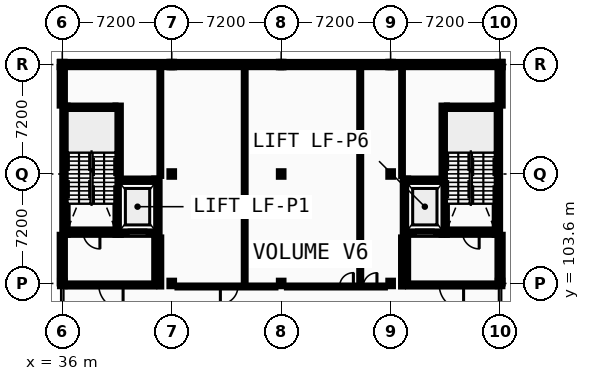
"""IFC4 building model, lengths in metres.
Left out: names, types, materials, properties, quantities, classifications, styles, units other than length and angle.
Written with IfcOpenShell. Run it as: python <this file> out.ifc"""

import sys

from ifc_helpers import new_model, si_unit, direction, frame, frame_2d, origin, origin_2d, place, context, subcontext, project, spatial, rectangle, i_section, extrude, element, fill, save


model = new_model("IFC4")
c1 = context("Model", 3, precision=1e-05, world=origin(), true_north=direction((0.0, 1.0)))
c2 = subcontext(c1, "Body", "Model", "MODEL_VIEW")
j1 = project(units=[si_unit("LENGTHUNIT", "METRE"), si_unit("PLANEANGLEUNIT", "RADIAN")], contexts=[c1])
p1 = place(None, origin())
s1 = spatial("IfcSite", under=j1, at=p1, CompositionType="ELEMENT")
p2 = place(p1, origin())
s2 = spatial("IfcBuilding", under=s1, at=p2, CompositionType="ELEMENT")
p3 = place(p2, frame((0.0, 0.0, 14.0)))
s3 = spatial("IfcBuildingStorey", under=s2, at=p3, CompositionType="ELEMENT", Elevation=14.0)
for number, where, z_axis, x_axis in (
    (1, (36.0, 103.6, 0.0), (0.0, 0.0, 1.0), (1.0, 0.0, 0.0)),
    (2, (36.0, 118.0, 0.0), (0.0, 0.0, 1.0), (1.0, 0.0, 0.0)),
    (3, (43.2, 103.6, 0.0), (0.0, 0.0, 1.0), (1.0, 0.0, 0.0)),
    (4, (43.2, 110.8, 0.0), (0.0, 0.0, 1.0), (1.0, 0.0, 0.0)),
    (5, (43.2, 118.0, 0.0), (0.0, 0.0, 1.0), (1.0, 0.0, 0.0)),
    (6, (50.4, 103.6, 0.0), (0.0, 0.0, 1.0), (1.0, 0.0, 0.0)),
    (7, (50.4, 110.8, 0.0), (0.0, 0.0, 1.0), (1.0, 0.0, 0.0)),
    (8, (50.4, 118.0, 0.0), (0.0, 0.0, 1.0), (1.0, 0.0, 0.0)),
    (9, (57.6, 103.6, 0.0), (0.0, 0.0, 1.0), (1.0, 0.0, 0.0)),
    (10, (57.6, 110.8, 0.0), (0.0, 0.0, 1.0), (1.0, 0.0, 0.0)),
    (11, (57.6, 118.0, 0.0), (0.0, 0.0, 1.0), (1.0, 0.0, 0.0)),
    (12, (64.8, 103.6, 0.0), (0.0, 0.0, 1.0), (1.0, 0.0, 0.0)),
    (13, (64.8, 118.0, 0.0), (0.0, 0.0, 1.0), (1.0, 0.0, 0.0)),
):
    element("IfcColumn", number, at=place(p3, frame(where, z_axis=z_axis, x_axis=x_axis)), inside=s3, PredefinedType="COLUMN", context=c2, shape_type="SweptSolid", body=[
        extrude(i_section(OverallWidth=0.3, OverallDepth=0.36, WebThickness=0.012, FlangeThickness=0.022, FilletRadius=0.027, at=origin_2d()), origin(), (0.0, 0.0, 1.0), 4.4),
    ])
p4 = place(p3, frame((43.2, 118.0, 0.0), z_axis=(0.0, 0.0, 1.0), x_axis=(-1.0, 0.0, 0.0)))
e14 = element("IfcWall", 14, at=p4, inside=s3, PredefinedType="STANDARD", context=c2, shape_type="SweptSolid", body=[
    extrude(rectangle(XDim=7.37, YDim=0.34, at=frame_2d((3.685, 0.0))), origin(), (0.0, 0.0, 1.0), 3.935),
])
p5 = place(p3, frame((50.4, 118.0, 0.0), z_axis=(0.0, 0.0, 1.0), x_axis=(-1.0, 0.0, 0.0)))
e15 = element("IfcWall", 15, at=p5, inside=s3, PredefinedType="STANDARD", context=c2, shape_type="SweptSolid", body=[
    extrude(rectangle(XDim=7.2, YDim=0.34, at=frame_2d((3.6, 0.0))), origin(), (0.0, 0.0, 1.0), 3.935),
])
p6 = place(p3, frame((57.6, 118.0, 0.0), z_axis=(0.0, 0.0, 1.0), x_axis=(-1.0, 0.0, 0.0)))
e16 = element("IfcWall", 16, at=p6, inside=s3, PredefinedType="STANDARD", context=c2, shape_type="SweptSolid", body=[
    extrude(rectangle(XDim=7.2, YDim=0.34, at=frame_2d((3.6, 0.0))), origin(), (0.0, 0.0, 1.0), 3.935),
])
p7 = place(p6, frame((2.5, 0.0, 0.95)))
e17 = element("IfcOpeningElement", 17, at=p7, cuts=e16, PredefinedType="OPENING", context=c2, shape_type="SweptSolid", body=[
    extrude(rectangle(XDim=2.2, YDim=1.75, at=frame_2d((1.1, 0.875))), frame((0.0, 0.18, 0.0), z_axis=(0.0, -1.0, 0.0), x_axis=(1.0, 0.0, 0.0)), (0.0, 0.0, 1.0), 0.36),
])
p8 = place(p3, frame((64.97, 118.0, 0.0), z_axis=(0.0, 0.0, 1.0), x_axis=(-1.0, 0.0, 0.0)))
e18 = element("IfcWall", 18, at=p8, inside=s3, PredefinedType="STANDARD", context=c2, shape_type="SweptSolid", body=[
    extrude(rectangle(XDim=7.37, YDim=0.34, at=frame_2d((3.685, 0.0))), origin(), (0.0, 0.0, 1.0), 3.935),
])
p9 = place(p8, frame((1.781, 0.0, 0.95)))
e19 = element("IfcOpeningElement", 19, at=p9, cuts=e18, PredefinedType="OPENING", context=c2, shape_type="SweptSolid", body=[
    extrude(rectangle(XDim=0.86, YDim=1.26, at=frame_2d((0.43, 0.63))), frame((0.0, 0.18, 0.0), z_axis=(0.0, -1.0, 0.0), x_axis=(1.0, 0.0, 0.0)), (0.0, 0.0, 1.0), 0.36),
])
p10 = place(p8, frame((4.729, 0.0, 0.95)))
e20 = element("IfcOpeningElement", 20, at=p10, cuts=e18, PredefinedType="OPENING", context=c2, shape_type="SweptSolid", body=[
    extrude(rectangle(XDim=0.86, YDim=1.26, at=frame_2d((0.43, 0.63))), frame((0.0, 0.18, 0.0), z_axis=(0.0, -1.0, 0.0), x_axis=(1.0, 0.0, 0.0)), (0.0, 0.0, 1.0), 0.36),
])
p11 = place(p3, frame((36.0, 106.8, 0.0), z_axis=(0.0, 0.0, 1.0), x_axis=(0.0, -1.0, 0.0)))
e21 = element("IfcWall", 21, at=p11, inside=s3, PredefinedType="STANDARD", context=c2, shape_type="SweptSolid", body=[
    extrude(rectangle(XDim=3.2, YDim=0.34, at=frame_2d((1.6, 0.0))), origin(), (0.0, 0.0, 1.0), 4.2),
])
p12 = place(p11, frame((1.153, 0.0, 0.95)))
e22 = element("IfcOpeningElement", 22, at=p12, cuts=e21, PredefinedType="OPENING", context=c2, shape_type="SweptSolid", body=[
    extrude(rectangle(XDim=0.894, YDim=1.26, at=frame_2d((0.447, 0.63))), frame((0.0, 0.18, 0.0), z_axis=(0.0, -1.0, 0.0), x_axis=(1.0, 0.0, 0.0)), (0.0, 0.0, 1.0), 0.36),
])
p13 = place(p3, frame((36.0, 117.83, 0.0), z_axis=(0.0, 0.0, 1.0), x_axis=(0.0, -1.0, 0.0)))
e23 = element("IfcWall", 23, at=p13, inside=s3, PredefinedType="STANDARD", context=c2, shape_type="SweptSolid", body=[
    extrude(rectangle(XDim=2.53, YDim=0.34, at=frame_2d((1.265, 0.0))), origin(), (0.0, 0.0, 1.0), 4.2),
])
p14 = place(p3, frame((64.8, 103.6, 0.0), z_axis=(0.0, 0.0, 1.0), x_axis=(0.0, 1.0, 0.0)))
e24 = element("IfcWall", 24, at=p14, inside=s3, PredefinedType="STANDARD", context=c2, shape_type="SweptSolid", body=[
    extrude(rectangle(XDim=3.2, YDim=0.34, at=frame_2d((1.6, 0.0))), origin(), (0.0, 0.0, 1.0), 4.2),
])
p15 = place(p14, frame((1.119, 0.0, 0.95)))
e25 = element("IfcOpeningElement", 25, at=p15, cuts=e24, PredefinedType="OPENING", context=c2, shape_type="SweptSolid", body=[
    extrude(rectangle(XDim=0.962, YDim=1.26, at=frame_2d((0.481, 0.63))), frame((0.0, 0.18, 0.0), z_axis=(0.0, -1.0, 0.0), x_axis=(1.0, 0.0, 0.0)), (0.0, 0.0, 1.0), 0.36),
])
p16 = place(p3, frame((64.8, 115.3, 0.0), z_axis=(0.0, 0.0, 1.0), x_axis=(0.0, 1.0, 0.0)))
e26 = element("IfcWall", 26, at=p16, inside=s3, PredefinedType="STANDARD", context=c2, shape_type="SweptSolid", body=[
    extrude(rectangle(XDim=2.53, YDim=0.34, at=frame_2d((1.265, 0.0))), origin(), (0.0, 0.0, 1.0), 4.2),
])
p17 = place(p3, frame((36.35, 106.975, 0.0), z_axis=(0.0, 0.0, 1.0), x_axis=(1.0, 0.0, 0.0)))
e27 = element("IfcWall", 27, at=p17, inside=s3, PredefinedType="SHEAR", context=c2, shape_type="SweptSolid", body=[
    extrude(rectangle(XDim=3.15, YDim=0.35, at=frame_2d((1.575, 0.0))), origin(), (0.0, 0.0, 1.0), 4.2),
])
p18 = place(p17, frame((1.025, 0.0, 0.0)))
e28 = element("IfcOpeningElement", 28, at=p18, cuts=e27, PredefinedType="OPENING", context=c2, shape_type="SweptSolid", body=[
    extrude(rectangle(XDim=1.1, YDim=2.15, at=frame_2d((0.55, 1.075))), frame((0.0, 0.185, 0.0), z_axis=(0.0, -1.0, 0.0), x_axis=(1.0, 0.0, 0.0)), (0.0, 0.0, 1.0), 0.37),
])
p19 = place(p3, frame((36.35, 115.125, 0.0), z_axis=(0.0, 0.0, 1.0), x_axis=(1.0, 0.0, 0.0)))
e29 = element("IfcWall", 29, at=p19, inside=s3, PredefinedType="SHEAR", context=c2, shape_type="SweptSolid", body=[
    extrude(rectangle(XDim=3.15, YDim=0.35, at=frame_2d((1.575, 0.0))), origin(), (0.0, 0.0, 1.0), 4.2),
])
for number, where, z_axis, x_axis in (
    (30, (36.175, 106.8, 0.0), (0.0, 0.0, 1.0), (0.0, 1.0, 0.0)),
    (31, (39.675, 106.8, 0.0), (0.0, 0.0, 1.0), (0.0, 1.0, 0.0)),
):
    element("IfcWall", number, at=place(p3, frame(where, z_axis=z_axis, x_axis=x_axis)), inside=s3, PredefinedType="SHEAR", context=c2, shape_type="SweptSolid", body=[
        extrude(rectangle(XDim=8.5, YDim=0.35, at=frame_2d((4.25, 0.0))), origin(), (0.0, 0.0, 1.0), 4.2),
    ])
p20 = place(p3, frame((39.85, 106.975, 0.0), z_axis=(0.0, 0.0, 1.0), x_axis=(1.0, 0.0, 0.0)))
e32 = element("IfcWall", 32, at=p20, inside=s3, PredefinedType="SHEAR", context=c2, shape_type="SweptSolid", body=[
    extrude(rectangle(XDim=2.2, YDim=0.35, at=frame_2d((1.1, 0.0))), origin(), (0.0, 0.0, 1.0), 4.2),
])
p21 = place(p20, frame((0.5, 0.0, 0.0)))
e33 = element("IfcOpeningElement", 33, at=p21, cuts=e32, PredefinedType="OPENING", context=c2, shape_type="SweptSolid", body=[
    extrude(rectangle(XDim=1.2, YDim=2.2, at=frame_2d((0.6, 1.1))), frame((0.0, 0.185, 0.0), z_axis=(0.0, -1.0, 0.0), x_axis=(1.0, 0.0, 0.0)), (0.0, 0.0, 1.0), 0.37),
])
p22 = place(p3, frame((39.85, 110.325, 0.0), z_axis=(0.0, 0.0, 1.0), x_axis=(1.0, 0.0, 0.0)))
e34 = element("IfcWall", 34, at=p22, inside=s3, PredefinedType="SHEAR", context=c2, shape_type="SweptSolid", body=[
    extrude(rectangle(XDim=2.2, YDim=0.35, at=frame_2d((1.1, 0.0))), origin(), (0.0, 0.0, 1.0), 4.2),
])
p23 = place(p3, frame((42.225, 106.8, 0.0), z_axis=(0.0, 0.0, 1.0), x_axis=(0.0, 1.0, 0.0)))
e35 = element("IfcWall", 35, at=p23, inside=s3, PredefinedType="SHEAR", context=c2, shape_type="SweptSolid", body=[
    extrude(rectangle(XDim=3.7, YDim=0.35, at=frame_2d((1.85, 0.0))), origin(), (0.0, 0.0, 1.0), 4.2),
])
p24 = place(p3, frame((36.35, 103.5, 0.0), z_axis=(0.0, 0.0, 1.0), x_axis=(1.0, 0.0, 0.0)))
e36 = element("IfcWall", 36, at=p24, inside=s3, PredefinedType="PARTITIONING", context=c2, shape_type="SweptSolid", body=[
    extrude(rectangle(XDim=5.7, YDim=0.2, at=frame_2d((2.85, 0.0))), origin(), (0.0, 0.0, 1.0), 3.935),
])
p25 = place(p24, frame((2.05, 0.0, 0.0)))
e37 = element("IfcOpeningElement", 37, at=p25, cuts=e36, PredefinedType="OPENING", context=c2, shape_type="SweptSolid", body=[
    extrude(rectangle(XDim=1.6, YDim=2.2, at=frame_2d((0.8, 1.1))), frame((0.0, 0.11, 0.0), z_axis=(0.0, -1.0, 0.0), x_axis=(1.0, 0.0, 0.0)), (0.0, 0.0, 1.0), 0.22),
])
p26 = place(p3, frame((42.15, 103.6, 0.0), z_axis=(0.0, 0.0, 1.0), x_axis=(0.0, 1.0, 0.0)))
e38 = element("IfcWall", 38, at=p26, inside=s3, PredefinedType="PARTITIONING", context=c2, shape_type="SweptSolid", body=[
    extrude(rectangle(XDim=3.2, YDim=0.2, at=frame_2d((1.6, 0.0))), origin(), (0.0, 0.0, 1.0), 4.2),
])
p27 = place(p3, frame((61.3, 106.975, 0.0), z_axis=(0.0, 0.0, 1.0), x_axis=(1.0, 0.0, 0.0)))
e39 = element("IfcWall", 39, at=p27, inside=s3, PredefinedType="SHEAR", context=c2, shape_type="SweptSolid", body=[
    extrude(rectangle(XDim=3.15, YDim=0.35, at=frame_2d((1.575, 0.0))), origin(), (0.0, 0.0, 1.0), 4.2),
])
p28 = place(p27, frame((1.025, 0.0, 0.0)))
e40 = element("IfcOpeningElement", 40, at=p28, cuts=e39, PredefinedType="OPENING", context=c2, shape_type="SweptSolid", body=[
    extrude(rectangle(XDim=1.1, YDim=2.15, at=frame_2d((0.55, 1.075))), frame((0.0, 0.185, 0.0), z_axis=(0.0, -1.0, 0.0), x_axis=(1.0, 0.0, 0.0)), (0.0, 0.0, 1.0), 0.37),
])
p29 = place(p3, frame((61.3, 115.125, 0.0), z_axis=(0.0, 0.0, 1.0), x_axis=(1.0, 0.0, 0.0)))
e41 = element("IfcWall", 41, at=p29, inside=s3, PredefinedType="SHEAR", context=c2, shape_type="SweptSolid", body=[
    extrude(rectangle(XDim=3.15, YDim=0.35, at=frame_2d((1.575, 0.0))), origin(), (0.0, 0.0, 1.0), 4.2),
])
for number, where, z_axis, x_axis in (
    (42, (61.125, 106.8, 0.0), (0.0, 0.0, 1.0), (0.0, 1.0, 0.0)),
    (43, (64.625, 106.8, 0.0), (0.0, 0.0, 1.0), (0.0, 1.0, 0.0)),
):
    element("IfcWall", number, at=place(p3, frame(where, z_axis=z_axis, x_axis=x_axis)), inside=s3, PredefinedType="SHEAR", context=c2, shape_type="SweptSolid", body=[
        extrude(rectangle(XDim=8.5, YDim=0.35, at=frame_2d((4.25, 0.0))), origin(), (0.0, 0.0, 1.0), 4.2),
    ])
p30 = place(p3, frame((58.75, 106.975, 0.0), z_axis=(0.0, 0.0, 1.0), x_axis=(1.0, 0.0, 0.0)))
e44 = element("IfcWall", 44, at=p30, inside=s3, PredefinedType="SHEAR", context=c2, shape_type="SweptSolid", body=[
    extrude(rectangle(XDim=2.2, YDim=0.35, at=frame_2d((1.1, 0.0))), origin(), (0.0, 0.0, 1.0), 4.2),
])
p31 = place(p30, frame((0.5, 0.0, 0.0)))
e45 = element("IfcOpeningElement", 45, at=p31, cuts=e44, PredefinedType="OPENING", context=c2, shape_type="SweptSolid", body=[
    extrude(rectangle(XDim=1.2, YDim=2.2, at=frame_2d((0.6, 1.1))), frame((0.0, 0.185, 0.0), z_axis=(0.0, -1.0, 0.0), x_axis=(1.0, 0.0, 0.0)), (0.0, 0.0, 1.0), 0.37),
])
p32 = place(p3, frame((58.75, 110.325, 0.0), z_axis=(0.0, 0.0, 1.0), x_axis=(1.0, 0.0, 0.0)))
e46 = element("IfcWall", 46, at=p32, inside=s3, PredefinedType="SHEAR", context=c2, shape_type="SweptSolid", body=[
    extrude(rectangle(XDim=2.2, YDim=0.35, at=frame_2d((1.1, 0.0))), origin(), (0.0, 0.0, 1.0), 4.2),
])
p33 = place(p3, frame((58.575, 106.8, 0.0), z_axis=(0.0, 0.0, 1.0), x_axis=(0.0, 1.0, 0.0)))
e47 = element("IfcWall", 47, at=p33, inside=s3, PredefinedType="SHEAR", context=c2, shape_type="SweptSolid", body=[
    extrude(rectangle(XDim=3.7, YDim=0.35, at=frame_2d((1.85, 0.0))), origin(), (0.0, 0.0, 1.0), 4.2),
])
p34 = place(p3, frame((58.75, 103.5, 0.0), z_axis=(0.0, 0.0, 1.0), x_axis=(1.0, 0.0, 0.0)))
e48 = element("IfcWall", 48, at=p34, inside=s3, PredefinedType="PARTITIONING", context=c2, shape_type="SweptSolid", body=[
    extrude(rectangle(XDim=5.7, YDim=0.2, at=frame_2d((2.85, 0.0))), origin(), (0.0, 0.0, 1.0), 3.935),
])
p35 = place(p34, frame((2.05, 0.0, 0.0)))
e49 = element("IfcOpeningElement", 49, at=p35, cuts=e48, PredefinedType="OPENING", context=c2, shape_type="SweptSolid", body=[
    extrude(rectangle(XDim=1.6, YDim=2.2, at=frame_2d((0.8, 1.1))), frame((0.0, 0.11, 0.0), z_axis=(0.0, -1.0, 0.0), x_axis=(1.0, 0.0, 0.0)), (0.0, 0.0, 1.0), 0.22),
])
p36 = place(p3, frame((58.65, 103.6, 0.0), z_axis=(0.0, 0.0, 1.0), x_axis=(0.0, 1.0, 0.0)))
e50 = element("IfcWall", 50, at=p36, inside=s3, PredefinedType="PARTITIONING", context=c2, shape_type="SweptSolid", body=[
    extrude(rectangle(XDim=3.2, YDim=0.2, at=frame_2d((1.6, 0.0))), origin(), (0.0, 0.0, 1.0), 4.2),
])
p37 = place(p3, frame((43.58, 103.4, 0.0), z_axis=(0.0, 0.0, 1.0), x_axis=(1.0, 0.0, 0.0)))
e51 = element("IfcWall", 51, at=p37, inside=s3, PredefinedType="PARTITIONING", context=c2, shape_type="SweptSolid", body=[
    extrude(rectangle(XDim=6.44, YDim=0.125, at=frame_2d((3.22, 0.0))), origin(), (0.0, 0.0, 1.0), 3.935),
])
p38 = place(p37, frame((2.82, 0.0, 0.0)))
e52 = element("IfcOpeningElement", 52, at=p38, cuts=e51, PredefinedType="OPENING", context=c2, shape_type="SweptSolid", body=[
    extrude(rectangle(XDim=1.15, YDim=2.15, at=frame_2d((0.575, 1.075))), frame((0.0, 0.073, 0.0), z_axis=(0.0, -1.0, 0.0), x_axis=(1.0, 0.0, 0.0)), (0.0, 0.0, 1.0), 0.145),
])
p39 = place(p3, frame((50.78, 103.4, 0.0), z_axis=(0.0, 0.0, 1.0), x_axis=(1.0, 0.0, 0.0)))
e53 = element("IfcWall", 53, at=p39, inside=s3, PredefinedType="PARTITIONING", context=c2, shape_type="SweptSolid", body=[
    extrude(rectangle(XDim=6.44, YDim=0.125, at=frame_2d((3.22, 0.0))), origin(), (0.0, 0.0, 1.0), 3.935),
])
p40 = place(p39, frame((5.02, 0.0, 0.0)))
e54 = element("IfcOpeningElement", 54, at=p40, cuts=e53, PredefinedType="OPENING", context=c2, shape_type="SweptSolid", body=[
    extrude(rectangle(XDim=0.9, YDim=2.1, at=frame_2d((0.45, 1.05))), frame((0.0, 0.073, 0.0), z_axis=(0.0, -1.0, 0.0), x_axis=(1.0, 0.0, 0.0)), (0.0, 0.0, 1.0), 0.145),
])
p41 = place(p39, frame((3.464, 0.0, 0.0)))
e55 = element("IfcOpeningElement", 55, at=p41, cuts=e53, PredefinedType="OPENING", context=c2, shape_type="SweptSolid", body=[
    extrude(rectangle(XDim=0.906, YDim=2.068, at=frame_2d((0.453, 1.034))), frame((0.0, 0.073, 0.0), z_axis=(0.0, -1.0, 0.0), x_axis=(1.0, 0.0, 0.0)), (0.0, 0.0, 1.0), 0.145),
])
p42 = place(p3, frame((42.45, 103.4, 0.0), z_axis=(0.0, 0.0, 1.0), x_axis=(0.0, 1.0, 0.0)))
e56 = element("IfcWall", 56, at=p42, inside=s3, PredefinedType="PARTITIONING", context=c2, shape_type="SweptSolid", body=[
    extrude(rectangle(XDim=3.225, YDim=0.118, at=frame_2d((1.613, 0.0))), origin(), (0.0, 0.0, 1.0), 4.2),
])
p43 = place(p3, frame((42.45, 110.675, 0.0), z_axis=(0.0, 0.0, 1.0), x_axis=(0.0, 1.0, 0.0)))
e57 = element("IfcWall", 57, at=p43, inside=s3, PredefinedType="PARTITIONING", context=c2, shape_type="SweptSolid", body=[
    extrude(rectangle(XDim=7.125, YDim=0.118, at=frame_2d((3.562, 0.0))), origin(), (0.0, 0.0, 1.0), 4.2),
])
p44 = place(p3, frame((48.0, 103.462, 0.0), z_axis=(0.0, 0.0, 1.0), x_axis=(0.0, 1.0, 0.0)))
e58 = element("IfcWall", 58, at=p44, inside=s3, PredefinedType="PARTITIONING", context=c2, shape_type="SweptSolid", body=[
    extrude(rectangle(XDim=14.338, YDim=0.118, at=frame_2d((7.169, 0.0))), origin(), (0.0, 0.0, 1.0), 3.945),
])
p45 = place(p3, frame((55.6, 103.462, 0.0), z_axis=(0.0, 0.0, 1.0), x_axis=(0.0, 1.0, 0.0)))
e59 = element("IfcWall", 59, at=p45, inside=s3, PredefinedType="PARTITIONING", context=c2, shape_type="SweptSolid", body=[
    extrude(rectangle(XDim=14.338, YDim=0.125, at=frame_2d((7.169, 0.0))), origin(), (0.0, 0.0, 1.0), 4.2),
])
p46 = place(p3, frame((58.35, 103.4, 0.0), z_axis=(0.0, 0.0, 1.0), x_axis=(0.0, 1.0, 0.0)))
e60 = element("IfcWall", 60, at=p46, inside=s3, PredefinedType="PARTITIONING", context=c2, shape_type="SweptSolid", body=[
    extrude(rectangle(XDim=3.225, YDim=0.125, at=frame_2d((1.613, 0.0))), origin(), (0.0, 0.0, 1.0), 4.2),
])
p47 = place(p3, frame((58.35, 110.675, 0.0), z_axis=(0.0, 0.0, 1.0), x_axis=(0.0, 1.0, 0.0)))
e61 = element("IfcWall", 61, at=p47, inside=s3, PredefinedType="PARTITIONING", context=c2, shape_type="SweptSolid", body=[
    extrude(rectangle(XDim=7.125, YDim=0.11, at=frame_2d((3.562, 0.0))), origin(), (0.0, 0.0, 1.0), 4.2),
])
p48 = place(p7, origin())
e62 = element("IfcWindow", 62, at=p48, inside=s3, PartitioningType="SINGLE_PANEL", PredefinedType="WINDOW", context=c2, shape_type="SweptSolid", body=[
    extrude(rectangle(XDim=2.2, YDim=1.75, at=frame_2d((1.1, 0.875))), frame((0.0, 0.03, 0.0), z_axis=(0.0, -1.0, 0.0), x_axis=(1.0, 0.0, 0.0)), (0.0, 0.0, 1.0), 0.06),
])
fill(e17, e62)
p49 = place(p9, origin())
e63 = element("IfcWindow", 63, at=p49, inside=s3, PartitioningType="SINGLE_PANEL", PredefinedType="WINDOW", context=c2, shape_type="SweptSolid", body=[
    extrude(rectangle(XDim=0.86, YDim=1.26, at=frame_2d((0.43, 0.63))), frame((0.0, 0.03, 0.0), z_axis=(0.0, -1.0, 0.0), x_axis=(1.0, 0.0, 0.0)), (0.0, 0.0, 1.0), 0.06),
])
fill(e19, e63)
p50 = place(p10, origin())
e64 = element("IfcWindow", 64, at=p50, inside=s3, PartitioningType="SINGLE_PANEL", PredefinedType="WINDOW", context=c2, shape_type="SweptSolid", body=[
    extrude(rectangle(XDim=0.86, YDim=1.26, at=frame_2d((0.43, 0.63))), frame((0.0, 0.03, 0.0), z_axis=(0.0, -1.0, 0.0), x_axis=(1.0, 0.0, 0.0)), (0.0, 0.0, 1.0), 0.06),
])
fill(e20, e64)
p51 = place(p12, origin())
e65 = element("IfcWindow", 65, at=p51, inside=s3, PartitioningType="SINGLE_PANEL", PredefinedType="WINDOW", context=c2, shape_type="SweptSolid", body=[
    extrude(rectangle(XDim=0.894, YDim=1.26, at=frame_2d((0.447, 0.63))), frame((0.0, 0.03, 0.0), z_axis=(0.0, -1.0, 0.0), x_axis=(1.0, 0.0, 0.0)), (0.0, 0.0, 1.0), 0.06),
])
fill(e22, e65)
p52 = place(p15, origin())
e66 = element("IfcWindow", 66, at=p52, inside=s3, PartitioningType="SINGLE_PANEL", PredefinedType="WINDOW", context=c2, shape_type="SweptSolid", body=[
    extrude(rectangle(XDim=0.962, YDim=1.26, at=frame_2d((0.481, 0.63))), frame((0.0, 0.03, 0.0), z_axis=(0.0, -1.0, 0.0), x_axis=(1.0, 0.0, 0.0)), (0.0, 0.0, 1.0), 0.06),
])
fill(e25, e66)
p53 = place(p18, origin())
e67 = element("IfcDoor", 67, at=p53, inside=s3, OperationType="SINGLE_SWING_RIGHT", PredefinedType="DOOR", context=c2, shape_type="SweptSolid", body=[
    extrude(rectangle(XDim=1.1, YDim=2.15, at=frame_2d((0.55, 1.075))), frame((0.0, 0.025, 0.0), z_axis=(0.0, -1.0, 0.0), x_axis=(1.0, 0.0, 0.0)), (0.0, 0.0, 1.0), 0.05),
])
fill(e28, e67)
p54 = place(p21, origin())
e68 = element("IfcDoor", 68, at=p54, inside=s3, OperationType="SLIDING_TO_RIGHT", PredefinedType="DOOR", context=c2, shape_type="SweptSolid", body=[
    extrude(rectangle(XDim=1.2, YDim=2.2, at=frame_2d((0.6, 1.1))), frame((0.0, 0.025, 0.0), z_axis=(0.0, -1.0, 0.0), x_axis=(1.0, 0.0, 0.0)), (0.0, 0.0, 1.0), 0.05),
])
fill(e33, e68)
p55 = place(p25, origin())
e69 = element("IfcDoor", 69, at=p55, inside=s3, OperationType="DOUBLE_DOOR_SINGLE_SWING", PredefinedType="DOOR", context=c2, shape_type="SweptSolid", body=[
    extrude(rectangle(XDim=1.6, YDim=2.2, at=frame_2d((0.8, 1.1))), frame((0.0, 0.025, 0.0), z_axis=(0.0, -1.0, 0.0), x_axis=(1.0, 0.0, 0.0)), (0.0, 0.0, 1.0), 0.05),
])
fill(e37, e69)
p56 = place(p28, origin())
e70 = element("IfcDoor", 70, at=p56, inside=s3, OperationType="SINGLE_SWING_RIGHT", PredefinedType="DOOR", context=c2, shape_type="SweptSolid", body=[
    extrude(rectangle(XDim=1.1, YDim=2.15, at=frame_2d((0.55, 1.075))), frame((0.0, 0.025, 0.0), z_axis=(0.0, -1.0, 0.0), x_axis=(1.0, 0.0, 0.0)), (0.0, 0.0, 1.0), 0.05),
])
fill(e40, e70)
p57 = place(p31, origin())
e71 = element("IfcDoor", 71, at=p57, inside=s3, OperationType="SLIDING_TO_RIGHT", PredefinedType="DOOR", context=c2, shape_type="SweptSolid", body=[
    extrude(rectangle(XDim=1.2, YDim=2.2, at=frame_2d((0.6, 1.1))), frame((0.0, 0.025, 0.0), z_axis=(0.0, -1.0, 0.0), x_axis=(1.0, 0.0, 0.0)), (0.0, 0.0, 1.0), 0.05),
])
fill(e45, e71)
p58 = place(p35, origin())
e72 = element("IfcDoor", 72, at=p58, inside=s3, OperationType="DOUBLE_DOOR_SINGLE_SWING", PredefinedType="DOOR", context=c2, shape_type="SweptSolid", body=[
    extrude(rectangle(XDim=1.6, YDim=2.2, at=frame_2d((0.8, 1.1))), frame((0.0, 0.025, 0.0), z_axis=(0.0, -1.0, 0.0), x_axis=(1.0, 0.0, 0.0)), (0.0, 0.0, 1.0), 0.05),
])
fill(e49, e72)
p59 = place(p40, frame((0.9, 0.0, 0.0), z_axis=(0.0, 0.0, 1.0), x_axis=(-1.0, 0.0, 0.0)))
e73 = element("IfcDoor", 73, at=p59, inside=s3, OperationType="SINGLE_SWING_RIGHT", PredefinedType="DOOR", context=c2, shape_type="SweptSolid", body=[
    extrude(rectangle(XDim=0.9, YDim=2.1, at=frame_2d((0.45, 1.05))), frame((0.0, 0.025, 0.0), z_axis=(0.0, -1.0, 0.0), x_axis=(1.0, 0.0, 0.0)), (0.0, 0.0, 1.0), 0.05),
])
fill(e54, e73)
p60 = place(p38, frame((1.15, 0.0, 0.0), z_axis=(0.0, 0.0, 1.0), x_axis=(-1.0, 0.0, 0.0)))
e74 = element("IfcDoor", 74, at=p60, inside=s3, OperationType="SINGLE_SWING_LEFT", PredefinedType="DOOR", context=c2, shape_type="SweptSolid", body=[
    extrude(rectangle(XDim=1.15, YDim=2.15, at=frame_2d((0.575, 1.075))), frame((0.0, 0.025, 0.0), z_axis=(0.0, -1.0, 0.0), x_axis=(1.0, 0.0, 0.0)), (0.0, 0.0, 1.0), 0.05),
])
fill(e52, e74)
p61 = place(p41, frame((0.906, 0.0, 0.0), z_axis=(0.0, 0.0, 1.0), x_axis=(-1.0, 0.0, 0.0)))
e75 = element("IfcDoor", 75, at=p61, inside=s3, OperationType="SINGLE_SWING_RIGHT", PredefinedType="DOOR", context=c2, shape_type="SweptSolid", body=[
    extrude(rectangle(XDim=0.906, YDim=2.068, at=frame_2d((0.453, 1.034))), frame((0.0, 0.025, 0.0), z_axis=(0.0, -1.0, 0.0), x_axis=(1.0, 0.0, 0.0)), (0.0, 0.0, 1.0), 0.05),
])
fill(e55, e75)
save(model, sys.argv[1])
